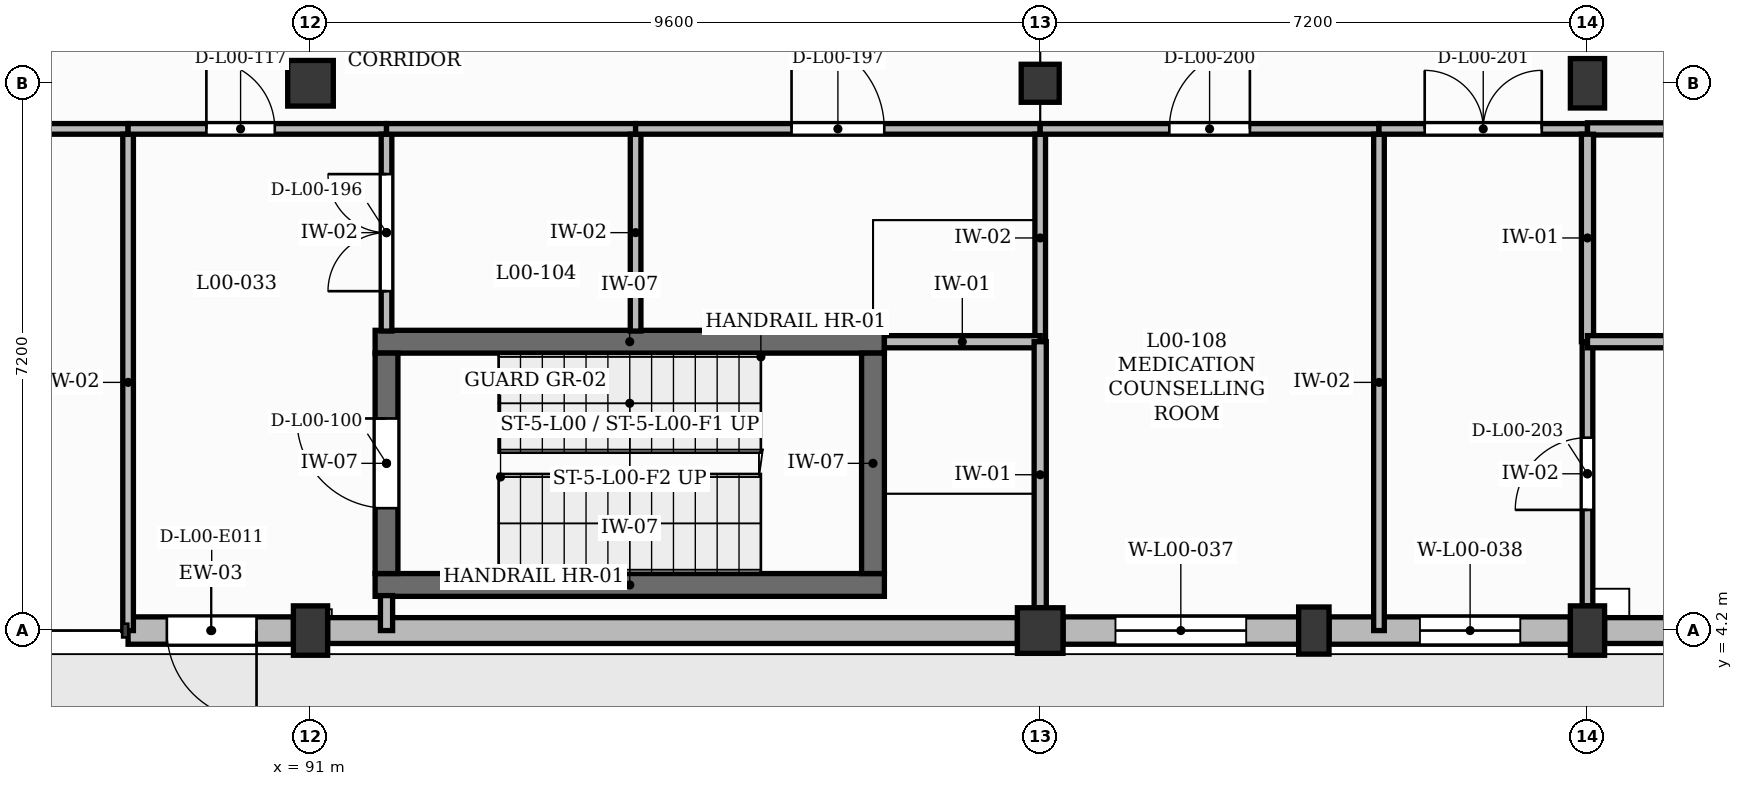
"""IFC4 building model, lengths in metres.
Left out: names, types, materials, properties, quantities, classifications, styles, units other than length and angle.
Written with IfcOpenShell. Run it as: python <this file> out.ifc"""

import sys

from ifc_helpers import new_model, si_unit, direction, frame, frame_2d, origin, origin_2d, place, context, subcontext, project, spatial, rectangle, extrude, element, fill, save


model = new_model("IFC4")
c1 = context("Model", 3, precision=1e-05, world=origin(), true_north=direction((0.0, 1.0)))
c2 = subcontext(c1, "Body", "Model", "MODEL_VIEW")
j1 = project(units=[si_unit("LENGTHUNIT", "METRE"), si_unit("PLANEANGLEUNIT", "RADIAN")], contexts=[c1])
p1 = place(None, origin())
s1 = spatial("IfcSite", under=j1, at=p1, CompositionType="ELEMENT")
p2 = place(p1, origin())
s2 = spatial("IfcBuilding", under=s1, at=p2, CompositionType="ELEMENT")
p3 = place(p2, origin())
s3 = spatial("IfcBuildingStorey", under=s2, at=p3, CompositionType="ELEMENT", Elevation=0.0)
p4 = place(p3, frame((91.0, 4.2, 0.0), z_axis=(0.0, 0.0, 1.0), x_axis=(1.0, 0.0, 0.0)))
e1 = element("IfcColumn", 1, at=p4, inside=s3, PredefinedType="COLUMN", context=c2, shape_type="SweptSolid", body=[
    extrude(rectangle(XDim=0.45, YDim=0.65, at=origin_2d()), origin(), (0.0, 0.0, 1.0), 4.2),
])
for number, where, z_axis, x_axis in (
    (2, (91.0, 11.4, 0.0), (0.0, 0.0, 1.0), (1.0, 0.0, 0.0)),
    (3, (100.6, 4.2, 0.0), (0.0, 0.0, 1.0), (1.0, 0.0, 0.0)),
):
    element("IfcColumn", number, at=place(p3, frame(where, z_axis=z_axis, x_axis=x_axis)), inside=s3, PredefinedType="COLUMN", context=c2, shape_type="SweptSolid", body=[
        extrude(rectangle(XDim=0.6, YDim=0.6, at=origin_2d()), origin(), (0.0, 0.0, 1.0), 4.2),
    ])
p5 = place(p3, frame((100.6, 11.4, 0.0), z_axis=(0.0, 0.0, 1.0), x_axis=(1.0, 0.0, 0.0)))
e4 = element("IfcColumn", 4, at=p5, inside=s3, PredefinedType="COLUMN", context=c2, shape_type="SweptSolid", body=[
    extrude(rectangle(XDim=0.5, YDim=0.5, at=origin_2d()), origin(), (0.0, 0.0, 1.0), 4.2),
])
for number, where, z_axis, x_axis in (
    (5, (107.8, 4.2, 0.0), (0.0, 0.0, 1.0), (1.0, 0.0, 0.0)),
    (6, (107.8, 11.4, 0.0), (0.0, 0.0, 1.0), (1.0, 0.0, 0.0)),
):
    element("IfcColumn", number, at=place(p3, frame(where, z_axis=z_axis, x_axis=x_axis)), inside=s3, PredefinedType="COLUMN", context=c2, shape_type="SweptSolid", body=[
        extrude(rectangle(XDim=0.45, YDim=0.65, at=origin_2d()), origin(), (0.0, 0.0, 1.0), 4.2),
    ])
p6 = place(p3, frame((104.2, 4.2, 0.0), z_axis=(0.0, 0.0, 1.0), x_axis=(1.0, 0.0, 0.0)))
e7 = element("IfcColumn", 7, at=p6, inside=s3, PredefinedType="PILASTER", context=c2, shape_type="SweptSolid", body=[
    extrude(rectangle(XDim=0.4, YDim=0.62, at=origin_2d()), origin(), (0.0, 0.0, 1.0), 4.2),
])
p7 = place(p3, frame((88.6, 4.2, 0.0), z_axis=(0.0, 0.0, 1.0), x_axis=(1.0, 0.0, 0.0)))
e8 = element("IfcWall", 8, at=p7, inside=s3, PredefinedType="SOLIDWALL", context=c2, shape_type="SweptSolid", body=[
    extrude(rectangle(XDim=2.175, YDim=0.36, at=frame_2d((1.087, 0.0))), origin(), (0.0, 0.0, 1.0), 3.68),
])
p8 = place(p7, frame((0.51, 0.0, 0.0)))
e9 = element("IfcOpeningElement", 9, at=p8, cuts=e8, PredefinedType="OPENING", context=c2, shape_type="SweptSolid", body=[
    extrude(rectangle(XDim=1.18, YDim=2.2, at=frame_2d((0.59, 1.1))), frame((0.0, 0.19, 0.0), z_axis=(0.0, -1.0, 0.0), x_axis=(1.0, 0.0, 0.0)), (0.0, 0.0, 1.0), 0.38),
])
p9 = place(p3, frame((91.225, 4.2, 0.0), z_axis=(0.0, 0.0, 1.0), x_axis=(1.0, 0.0, 0.0)))
e10 = element("IfcWall", 10, at=p9, inside=s3, PredefinedType="SOLIDWALL", context=c2, shape_type="SweptSolid", body=[
    extrude(rectangle(XDim=9.075, YDim=0.34, at=frame_2d((4.538, 0.0))), origin(), (0.0, 0.0, 1.0), 3.68),
])
p10 = place(p3, frame((100.9, 4.2, 0.0), z_axis=(0.0, 0.0, 1.0), x_axis=(1.0, 0.0, 0.0)))
e11 = element("IfcWall", 11, at=p10, inside=s3, PredefinedType="SOLIDWALL", context=c2, shape_type="SweptSolid", body=[
    extrude(rectangle(XDim=3.1, YDim=0.36, at=frame_2d((1.55, 0.0))), origin(), (0.0, 0.0, 1.0), 3.68),
])
p11 = place(p10, frame((0.69, 0.0, 1.0)))
e12 = element("IfcOpeningElement", 12, at=p11, cuts=e11, PredefinedType="OPENING", context=c2, shape_type="SweptSolid", body=[
    extrude(rectangle(XDim=1.72, YDim=2.2, at=frame_2d((0.86, 1.1))), frame((0.0, 0.19, 0.0), z_axis=(0.0, -1.0, 0.0), x_axis=(1.0, 0.0, 0.0)), (0.0, 0.0, 1.0), 0.38),
])
p12 = place(p3, frame((104.4, 4.2, 0.0), z_axis=(0.0, 0.0, 1.0), x_axis=(1.0, 0.0, 0.0)))
e13 = element("IfcWall", 13, at=p12, inside=s3, PredefinedType="SOLIDWALL", context=c2, shape_type="SweptSolid", body=[
    extrude(rectangle(XDim=3.175, YDim=0.36, at=frame_2d((1.587, 0.0))), origin(), (0.0, 0.0, 1.0), 3.68),
])
p13 = place(p12, frame((1.196, 0.0, 1.5)))
e14 = element("IfcOpeningElement", 14, at=p13, cuts=e13, PredefinedType="OPENING", context=c2, shape_type="SweptSolid", body=[
    extrude(rectangle(XDim=1.32, YDim=1.25, at=frame_2d((0.66, 0.625))), frame((0.0, 0.19, 0.0), z_axis=(0.0, -1.0, 0.0), x_axis=(1.0, 0.0, 0.0)), (0.0, 0.0, 1.0), 0.38),
])
p14 = place(p3, frame((108.025, 4.2, 0.0), z_axis=(0.0, 0.0, 1.0), x_axis=(1.0, 0.0, 0.0)))
e15 = element("IfcWall", 15, at=p14, inside=s3, PredefinedType="SOLIDWALL", context=c2, shape_type="SweptSolid", body=[
    extrude(rectangle(XDim=6.725, YDim=0.34, at=frame_2d((3.363, 0.0))), origin(), (0.0, 0.0, 1.0), 3.68),
])
p15 = place(p14, frame((4.985, 0.0, 0.0)))
e16 = element("IfcOpeningElement", 16, at=p15, cuts=e15, PredefinedType="OPENING", context=c2, shape_type="SweptSolid", body=[
    extrude(rectangle(XDim=1.18, YDim=2.2, at=frame_2d((0.59, 1.1))), frame((0.0, 0.18, 0.0), z_axis=(0.0, -1.0, 0.0), x_axis=(1.0, 0.0, 0.0)), (0.0, 0.0, 1.0), 0.36),
])
p16 = place(p14, frame((1.522, 0.0, 1.35)))
e17 = element("IfcOpeningElement", 17, at=p16, cuts=e15, PredefinedType="OPENING", context=c2, shape_type="SweptSolid", body=[
    extrude(rectangle(XDim=1.45, YDim=1.4, at=frame_2d((0.725, 0.7))), frame((0.0, 0.18, 0.0), z_axis=(0.0, -1.0, 0.0), x_axis=(1.0, 0.0, 0.0)), (0.0, 0.0, 1.0), 0.36),
])
for number, where, z_axis, x_axis in (
    (18, (91.85, 4.8, 0.0), (0.0, 0.0, 1.0), (1.0, 0.0, 0.0)),
    (19, (91.85, 8.0, 0.0), (0.0, 0.0, 1.0), (1.0, 0.0, 0.0)),
):
    element("IfcWall", number, at=place(p3, frame(where, z_axis=z_axis, x_axis=x_axis)), inside=s3, PredefinedType="SHEAR", context=c2, shape_type="SweptSolid", body=[
        extrude(rectangle(XDim=6.7, YDim=0.3, at=frame_2d((3.35, 0.0))), origin(), (0.0, 0.0, 1.0), 4.25),
    ])
p17 = place(p3, frame((92.0, 4.95, 0.0), z_axis=(0.0, 0.0, 1.0), x_axis=(0.0, 1.0, 0.0)))
e20 = element("IfcWall", 20, at=p17, inside=s3, PredefinedType="SHEAR", context=c2, shape_type="SweptSolid", body=[
    extrude(rectangle(XDim=2.9, YDim=0.3, at=frame_2d((1.45, 0.0))), origin(), (0.0, 0.0, 1.0), 4.25),
])
p18 = place(p17, frame((0.86, 0.0, 0.0)))
e21 = element("IfcOpeningElement", 21, at=p18, cuts=e20, PredefinedType="OPENING", context=c2, shape_type="SweptSolid", body=[
    extrude(rectangle(XDim=1.18, YDim=2.15, at=frame_2d((0.59, 1.075))), frame((0.0, 0.16, 0.0), z_axis=(0.0, -1.0, 0.0), x_axis=(1.0, 0.0, 0.0)), (0.0, 0.0, 1.0), 0.32),
])
p19 = place(p3, frame((98.4, 4.95, 0.0), z_axis=(0.0, 0.0, 1.0), x_axis=(0.0, 1.0, 0.0)))
e22 = element("IfcWall", 22, at=p19, inside=s3, PredefinedType="SHEAR", context=c2, shape_type="SweptSolid", body=[
    extrude(rectangle(XDim=2.9, YDim=0.3, at=frame_2d((1.45, 0.0))), origin(), (0.0, 0.0, 1.0), 4.25),
])
p20 = place(p3, frame((81.4, 10.8, 0.0), z_axis=(0.0, 0.0, 1.0), x_axis=(1.0, 0.0, 0.0)))
e23 = element("IfcWall", 23, at=p20, inside=s3, PredefinedType="PARTITIONING", context=c2, shape_type="SweptSolid", body=[
    extrude(rectangle(XDim=7.2, YDim=0.14, at=frame_2d((3.6, 0.0))), origin(), (0.0, 0.0, 1.0), 4.18),
])
p21 = place(p20, frame((3.125, 0.0, 0.0)))
e24 = element("IfcOpeningElement", 24, at=p21, cuts=e23, PredefinedType="OPENING", context=c2, shape_type="SweptSolid", body=[
    extrude(rectangle(XDim=0.95, YDim=2.1, at=frame_2d((0.475, 1.05))), frame((0.0, 0.08, 0.0), z_axis=(0.0, -1.0, 0.0), x_axis=(1.0, 0.0, 0.0)), (0.0, 0.0, 1.0), 0.16),
])
p22 = place(p3, frame((88.6, 4.2, 0.0), z_axis=(0.0, 0.0, 1.0), x_axis=(0.0, 1.0, 0.0)))
e25 = element("IfcWall", 25, at=p22, inside=s3, PredefinedType="PARTITIONING", context=c2, shape_type="SweptSolid", body=[
    extrude(rectangle(XDim=6.53, YDim=0.14, at=frame_2d((3.265, 0.0))), origin(), (0.0, 0.0, 1.0), 3.9),
])
p23 = place(p3, frame((88.6, 10.8, 0.0), z_axis=(0.0, 0.0, 1.0), x_axis=(1.0, 0.0, 0.0)))
e26 = element("IfcWall", 26, at=p23, inside=s3, PredefinedType="PARTITIONING", context=c2, shape_type="SweptSolid", body=[
    extrude(rectangle(XDim=3.4, YDim=0.14, at=frame_2d((1.7, 0.0))), origin(), (0.0, 0.0, 1.0), 4.18),
])
p24 = place(p23, frame((1.03, 0.0, 0.0)))
e27 = element("IfcOpeningElement", 27, at=p24, cuts=e26, PredefinedType="OPENING", context=c2, shape_type="SweptSolid", body=[
    extrude(rectangle(XDim=0.9, YDim=2.1, at=frame_2d((0.45, 1.05))), frame((0.0, 0.08, 0.0), z_axis=(0.0, -1.0, 0.0), x_axis=(1.0, 0.0, 0.0)), (0.0, 0.0, 1.0), 0.16),
])
p25 = place(p3, frame((92.0, 8.14, 0.0), z_axis=(0.0, 0.0, 1.0), x_axis=(0.0, 1.0, 0.0)))
e28 = element("IfcWall", 28, at=p25, inside=s3, PredefinedType="PARTITIONING", context=c2, shape_type="SweptSolid", body=[
    extrude(rectangle(XDim=2.59, YDim=0.14, at=frame_2d((1.295, 0.0))), origin(), (0.0, 0.0, 1.0), 4.18),
])
p26 = place(p25, frame((0.525, 0.0, 0.0)))
e29 = element("IfcOpeningElement", 29, at=p26, cuts=e28, PredefinedType="OPENING", context=c2, shape_type="SweptSolid", body=[
    extrude(rectangle(XDim=1.54, YDim=2.25, at=frame_2d((0.77, 1.125))), frame((0.0, 0.08, 0.0), z_axis=(0.0, -1.0, 0.0), x_axis=(1.0, 0.0, 0.0)), (0.0, 0.0, 1.0), 0.16),
])
p27 = place(p3, frame((92.0, 10.8, 0.0), z_axis=(0.0, 0.0, 1.0), x_axis=(1.0, 0.0, 0.0)))
e30 = element("IfcWall", 30, at=p27, inside=s3, PredefinedType="PARTITIONING", context=c2, shape_type="SweptSolid", body=[
    extrude(rectangle(XDim=3.277, YDim=0.14, at=frame_2d((1.639, 0.0))), origin(), (0.0, 0.0, 1.0), 4.18),
])
p28 = place(p3, frame((95.277, 8.14, 0.0), z_axis=(0.0, 0.0, 1.0), x_axis=(0.0, 1.0, 0.0)))
e31 = element("IfcWall", 31, at=p28, inside=s3, PredefinedType="PARTITIONING", context=c2, shape_type="SweptSolid", body=[
    extrude(rectangle(XDim=2.59, YDim=0.14, at=frame_2d((1.295, 0.0))), origin(), (0.0, 0.0, 1.0), 4.18),
])
p29 = place(p3, frame((95.277, 10.8, 0.0), z_axis=(0.0, 0.0, 1.0), x_axis=(1.0, 0.0, 0.0)))
e32 = element("IfcWall", 32, at=p29, inside=s3, PredefinedType="PARTITIONING", context=c2, shape_type="SweptSolid", body=[
    extrude(rectangle(XDim=5.323, YDim=0.14, at=frame_2d((2.662, 0.0))), origin(), (0.0, 0.0, 1.0), 4.18),
])
p30 = place(p29, frame((2.052, 0.0, 0.0)))
e33 = element("IfcOpeningElement", 33, at=p30, cuts=e32, PredefinedType="OPENING", context=c2, shape_type="SweptSolid", body=[
    extrude(rectangle(XDim=1.22, YDim=2.1, at=frame_2d((0.61, 1.05))), frame((0.0, 0.08, 0.0), z_axis=(0.0, -1.0, 0.0), x_axis=(1.0, 0.0, 0.0)), (0.0, 0.0, 1.0), 0.16),
])
p31 = place(p3, frame((100.6, 8.0, 0.0), z_axis=(0.0, 0.0, 1.0), x_axis=(0.0, 1.0, 0.0)))
e34 = element("IfcWall", 34, at=p31, inside=s3, PredefinedType="PARTITIONING", context=c2, shape_type="SweptSolid", body=[
    extrude(rectangle(XDim=2.73, YDim=0.14, at=frame_2d((1.365, 0.0))), origin(), (0.0, 0.0, 1.0), 3.5),
])
p32 = place(p3, frame((100.6, 10.8, 0.0), z_axis=(0.0, 0.0, 1.0), x_axis=(1.0, 0.0, 0.0)))
e35 = element("IfcWall", 35, at=p32, inside=s3, PredefinedType="PARTITIONING", context=c2, shape_type="SweptSolid", body=[
    extrude(rectangle(XDim=4.457, YDim=0.14, at=frame_2d((2.229, 0.0))), origin(), (0.0, 0.0, 1.0), 4.18),
])
p33 = place(p32, frame((1.698, 0.0, 0.0)))
e36 = element("IfcOpeningElement", 36, at=p33, cuts=e35, PredefinedType="OPENING", context=c2, shape_type="SweptSolid", body=[
    extrude(rectangle(XDim=1.06, YDim=2.15, at=frame_2d((0.53, 1.075))), frame((0.0, 0.08, 0.0), z_axis=(0.0, -1.0, 0.0), x_axis=(1.0, 0.0, 0.0)), (0.0, 0.0, 1.0), 0.16),
])
p34 = place(p3, frame((105.057, 4.2, 0.0), z_axis=(0.0, 0.0, 1.0), x_axis=(0.0, 1.0, 0.0)))
e37 = element("IfcWall", 37, at=p34, inside=s3, PredefinedType="PARTITIONING", context=c2, shape_type="SweptSolid", body=[
    extrude(rectangle(XDim=6.53, YDim=0.14, at=frame_2d((3.265, 0.0))), origin(), (0.0, 0.0, 1.0), 4.18),
])
p35 = place(p3, frame((105.057, 10.8, 0.0), z_axis=(0.0, 0.0, 1.0), x_axis=(1.0, 0.0, 0.0)))
e38 = element("IfcWall", 38, at=p35, inside=s3, PredefinedType="PARTITIONING", context=c2, shape_type="SweptSolid", body=[
    extrude(rectangle(XDim=2.743, YDim=0.14, at=frame_2d((1.372, 0.0))), origin(), (0.0, 0.0, 1.0), 4.18),
])
p36 = place(p35, frame((0.602, 0.0, 0.0)))
e39 = element("IfcOpeningElement", 39, at=p36, cuts=e38, PredefinedType="OPENING", context=c2, shape_type="SweptSolid", body=[
    extrude(rectangle(XDim=1.54, YDim=2.25, at=frame_2d((0.77, 1.125))), frame((0.0, 0.08, 0.0), z_axis=(0.0, -1.0, 0.0), x_axis=(1.0, 0.0, 0.0)), (0.0, 0.0, 1.0), 0.16),
])
p37 = place(p3, frame((107.8, 4.525, 0.0), z_axis=(0.0, 0.0, 1.0), x_axis=(0.0, 1.0, 0.0)))
e40 = element("IfcWall", 40, at=p37, inside=s3, PredefinedType="PARTITIONING", context=c2, shape_type="SweptSolid", body=[
    extrude(rectangle(XDim=3.475, YDim=0.14, at=frame_2d((1.738, 0.0))), origin(), (0.0, 0.0, 1.0), 3.5),
])
p38 = place(p37, frame((1.262, 0.0, 0.0)))
e41 = element("IfcOpeningElement", 41, at=p38, cuts=e40, PredefinedType="OPENING", context=c2, shape_type="SweptSolid", body=[
    extrude(rectangle(XDim=0.95, YDim=2.1, at=frame_2d((0.475, 1.05))), frame((0.0, 0.08, 0.0), z_axis=(0.0, -1.0, 0.0), x_axis=(1.0, 0.0, 0.0)), (0.0, 0.0, 1.0), 0.16),
])
p39 = place(p3, frame((107.8, 10.8, 0.0), z_axis=(0.0, 0.0, 1.0), x_axis=(1.0, 0.0, 0.0)))
e42 = element("IfcWall", 42, at=p39, inside=s3, PredefinedType="PARTITIONING", context=c2, shape_type="SweptSolid", body=[
    extrude(rectangle(XDim=4.6, YDim=0.16, at=frame_2d((2.3, 0.0))), origin(), (0.0, 0.0, 1.0), 4.18),
])
p40 = place(p3, frame((92.0, 4.2, 0.0), z_axis=(0.0, 0.0, 1.0), x_axis=(0.0, 1.0, 0.0)))
e43 = element("IfcWall", 43, at=p40, inside=s3, PredefinedType="PARTITIONING", context=c2, shape_type="SweptSolid", body=[
    extrude(rectangle(XDim=0.46, YDim=0.16, at=frame_2d((0.23, 0.0))), origin(), (0.0, 0.0, 1.0), 4.18),
])
p41 = place(p3, frame((98.55, 8.0, 0.0), z_axis=(0.0, 0.0, 1.0), x_axis=(1.0, 0.0, 0.0)))
e44 = element("IfcWall", 44, at=p41, inside=s3, PredefinedType="PARTITIONING", context=c2, shape_type="SweptSolid", body=[
    extrude(rectangle(XDim=2.05, YDim=0.16, at=frame_2d((1.025, 0.0))), origin(), (0.0, 0.0, 1.0), 4.18),
])
p42 = place(p3, frame((100.6, 4.5, 0.0), z_axis=(0.0, 0.0, 1.0), x_axis=(0.0, 1.0, 0.0)))
e45 = element("IfcWall", 45, at=p42, inside=s3, PredefinedType="PARTITIONING", context=c2, shape_type="SweptSolid", body=[
    extrude(rectangle(XDim=3.5, YDim=0.16, at=frame_2d((1.75, 0.0))), origin(), (0.0, 0.0, 1.0), 3.5),
])
p43 = place(p3, frame((107.8, 8.0, 0.0), z_axis=(0.0, 0.0, 1.0), x_axis=(0.0, 1.0, 0.0)))
e46 = element("IfcWall", 46, at=p43, inside=s3, PredefinedType="PARTITIONING", context=c2, shape_type="SweptSolid", body=[
    extrude(rectangle(XDim=2.73, YDim=0.16, at=frame_2d((1.365, 0.0))), origin(), (0.0, 0.0, 1.0), 3.5),
])
p44 = place(p3, frame((112.4, 8.0, 0.0), z_axis=(0.0, 0.0, 1.0), x_axis=(-1.0, 0.0, 0.0)))
e47 = element("IfcWall", 47, at=p44, inside=s3, PredefinedType="PARTITIONING", context=c2, shape_type="SweptSolid", body=[
    extrude(rectangle(XDim=4.6, YDim=0.16, at=frame_2d((2.3, 0.0))), origin(), (0.0, 0.0, 1.0), 4.18),
])
p45 = place(p8, frame((1.18, 0.0, 0.0), z_axis=(0.0, 0.0, 1.0), x_axis=(-1.0, 0.0, 0.0)))
e48 = element("IfcDoor", 48, at=p45, inside=s3, OperationType="SINGLE_SWING_LEFT", PredefinedType="DOOR", context=c2, shape_type="SweptSolid", body=[
    extrude(rectangle(XDim=1.18, YDim=2.2, at=frame_2d((0.59, 1.1))), frame((0.0, 0.025, 0.0), z_axis=(0.0, -1.0, 0.0), x_axis=(1.0, 0.0, 0.0)), (0.0, 0.0, 1.0), 0.05),
])
fill(e9, e48)
p46 = place(p11, origin())
e49 = element("IfcWindow", 49, at=p46, inside=s3, PartitioningType="DOUBLE_PANEL_VERTICAL", PredefinedType="WINDOW", context=c2, shape_type="SweptSolid", body=[
    extrude(rectangle(XDim=1.72, YDim=2.2, at=frame_2d((0.86, 1.1))), frame((0.0, 0.03, 0.0), z_axis=(0.0, -1.0, 0.0), x_axis=(1.0, 0.0, 0.0)), (0.0, 0.0, 1.0), 0.06),
])
fill(e12, e49)
p47 = place(p13, origin())
e50 = element("IfcWindow", 50, at=p47, inside=s3, PartitioningType="SINGLE_PANEL", PredefinedType="WINDOW", context=c2, shape_type="SweptSolid", body=[
    extrude(rectangle(XDim=1.32, YDim=1.25, at=frame_2d((0.66, 0.625))), frame((0.0, 0.03, 0.0), z_axis=(0.0, -1.0, 0.0), x_axis=(1.0, 0.0, 0.0)), (0.0, 0.0, 1.0), 0.06),
])
fill(e14, e50)
p48 = place(p18, origin())
e51 = element("IfcDoor", 51, at=p48, inside=s3, OperationType="SINGLE_SWING_RIGHT", PredefinedType="DOOR", context=c2, shape_type="SweptSolid", body=[
    extrude(rectangle(XDim=1.18, YDim=2.15, at=frame_2d((0.59, 1.075))), frame((0.0, 0.025, 0.0), z_axis=(0.0, -1.0, 0.0), x_axis=(1.0, 0.0, 0.0)), (0.0, 0.0, 1.0), 0.05),
])
fill(e21, e51)
p49 = place(p24, origin())
e52 = element("IfcDoor", 52, at=p49, inside=s3, OperationType="SINGLE_SWING_LEFT", PredefinedType="DOOR", context=c2, shape_type="SweptSolid", body=[
    extrude(rectangle(XDim=0.9, YDim=2.1, at=frame_2d((0.45, 1.05))), frame((0.0, 0.025, 0.0), z_axis=(0.0, -1.0, 0.0), x_axis=(1.0, 0.0, 0.0)), (0.0, 0.0, 1.0), 0.05),
])
fill(e27, e52)
p50 = place(p26, origin())
e53 = element("IfcDoor", 53, at=p50, inside=s3, OperationType="DOUBLE_DOOR_SINGLE_SWING", PredefinedType="DOOR", context=c2, shape_type="SweptSolid", body=[
    extrude(rectangle(XDim=1.54, YDim=2.25, at=frame_2d((0.77, 1.125))), frame((0.0, 0.025, 0.0), z_axis=(0.0, -1.0, 0.0), x_axis=(1.0, 0.0, 0.0)), (0.0, 0.0, 1.0), 0.05),
])
fill(e29, e53)
p51 = place(p30, origin())
e54 = element("IfcDoor", 54, at=p51, inside=s3, OperationType="SINGLE_SWING_LEFT", PredefinedType="DOOR", context=c2, shape_type="SweptSolid", body=[
    extrude(rectangle(XDim=1.22, YDim=2.1, at=frame_2d((0.61, 1.05))), frame((0.0, 0.025, 0.0), z_axis=(0.0, -1.0, 0.0), x_axis=(1.0, 0.0, 0.0)), (0.0, 0.0, 1.0), 0.05),
])
fill(e33, e54)
p52 = place(p33, origin())
e55 = element("IfcDoor", 55, at=p52, inside=s3, OperationType="SINGLE_SWING_RIGHT", PredefinedType="DOOR", context=c2, shape_type="SweptSolid", body=[
    extrude(rectangle(XDim=1.06, YDim=2.15, at=frame_2d((0.53, 1.075))), frame((0.0, 0.025, 0.0), z_axis=(0.0, -1.0, 0.0), x_axis=(1.0, 0.0, 0.0)), (0.0, 0.0, 1.0), 0.05),
])
fill(e36, e55)
p53 = place(p36, origin())
e56 = element("IfcDoor", 56, at=p53, inside=s3, OperationType="DOUBLE_DOOR_SINGLE_SWING", PredefinedType="DOOR", context=c2, shape_type="SweptSolid", body=[
    extrude(rectangle(XDim=1.54, YDim=2.25, at=frame_2d((0.77, 1.125))), frame((0.0, 0.025, 0.0), z_axis=(0.0, -1.0, 0.0), x_axis=(1.0, 0.0, 0.0)), (0.0, 0.0, 1.0), 0.05),
])
fill(e39, e56)
p54 = place(p38, origin())
e57 = element("IfcDoor", 57, at=p54, inside=s3, OperationType="SINGLE_SWING_LEFT", PredefinedType="DOOR", context=c2, shape_type="SweptSolid", body=[
    extrude(rectangle(XDim=0.95, YDim=2.1, at=frame_2d((0.475, 1.05))), frame((0.0, 0.025, 0.0), z_axis=(0.0, -1.0, 0.0), x_axis=(1.0, 0.0, 0.0)), (0.0, 0.0, 1.0), 0.05),
])
fill(e41, e57)
save(model, sys.argv[1])
